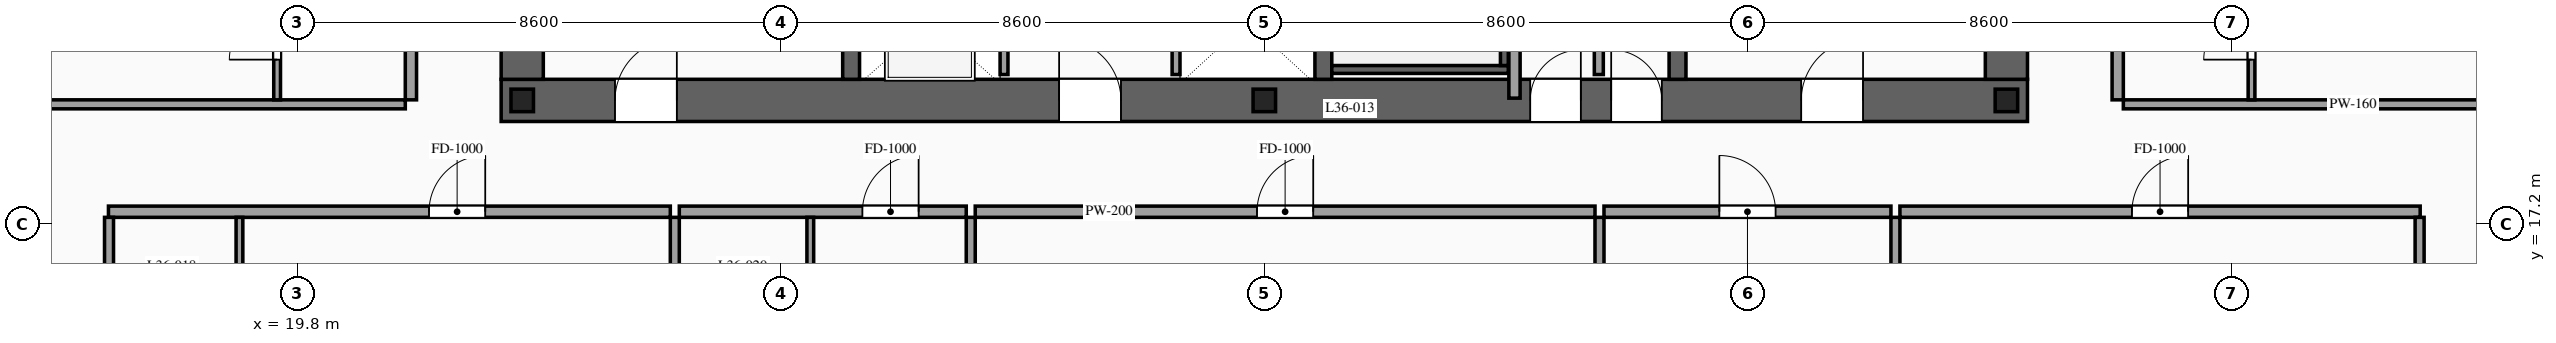
"""IFC4 building model, lengths in metres.
Left out: names, types, materials, properties, quantities, classifications, styles, units other than length and angle.
Written with IfcOpenShell. Run it as: python <this file> out.ifc"""

import sys

from ifc_helpers import new_model, si_unit, direction, frame, frame_2d, origin, origin_2d, place, context, subcontext, project, spatial, rectangle, i_section, extrude, source, transform, mapped, element, fill, save


model = new_model("IFC4")
c1 = context("Model", 3, precision=1e-05, world=origin(), true_north=direction((0.0, 1.0)))
c2 = subcontext(c1, "Body", "Model", "MODEL_VIEW")
j1 = project(units=[si_unit("LENGTHUNIT", "METRE"), si_unit("PLANEANGLEUNIT", "RADIAN")], contexts=[c1])
p1 = place(None, origin())
s1 = spatial("IfcSite", under=j1, at=p1, CompositionType="ELEMENT")
p2 = place(p1, origin())
s2 = spatial("IfcBuilding", under=s1, at=p2, CompositionType="ELEMENT")
p3 = place(p2, frame((0.0, 0.0, 138.0)))
s3 = spatial("IfcBuildingStorey", under=s2, at=p3, CompositionType="ELEMENT", Elevation=138.0)
p4 = place(p3, frame((23.425, 19.4, 0.0), z_axis=(0.0, 0.0, 1.0), x_axis=(1.0, 0.0, 0.0)))
e1 = element("IfcWall", 1, at=p4, inside=s3, PredefinedType="SHEAR", context=c2, shape_type="SweptSolid", body=[
    extrude(rectangle(XDim=27.15, YDim=0.75, at=frame_2d((13.575, 0.0))), origin(), (0.0, 0.0, 1.0), 3.6),
])
p5 = place(p4, frame((2.025, 0.0, 0.0)))
e2 = element("IfcOpeningElement", 2, at=p5, cuts=e1, PredefinedType="OPENING", context=c2, shape_type="SweptSolid", body=[
    extrude(rectangle(XDim=1.1, YDim=2.2, at=frame_2d((0.55, 1.1))), frame((0.0, 0.39, 0.0), z_axis=(0.0, -1.0, 0.0), x_axis=(1.0, 0.0, 0.0)), (0.0, 0.0, 1.0), 0.78),
])
p6 = place(p4, frame((9.925, 0.0, 0.0)))
e3 = element("IfcOpeningElement", 3, at=p6, cuts=e1, PredefinedType="OPENING", context=c2, shape_type="SweptSolid", body=[
    extrude(rectangle(XDim=1.1, YDim=2.2, at=frame_2d((0.55, 1.1))), frame((0.0, 0.39, 0.0), z_axis=(0.0, -1.0, 0.0), x_axis=(1.0, 0.0, 0.0)), (0.0, 0.0, 1.0), 0.78),
])
p7 = place(p4, frame((23.125, 0.0, 0.0)))
e4 = element("IfcOpeningElement", 4, at=p7, cuts=e1, PredefinedType="OPENING", context=c2, shape_type="SweptSolid", body=[
    extrude(rectangle(XDim=1.1, YDim=2.2, at=frame_2d((0.55, 1.1))), frame((0.0, 0.39, 0.0), z_axis=(0.0, -1.0, 0.0), x_axis=(1.0, 0.0, 0.0)), (0.0, 0.0, 1.0), 0.78),
])
p8 = place(p4, frame((19.745, 0.0, 0.0)))
e5 = element("IfcOpeningElement", 5, at=p8, cuts=e1, PredefinedType="OPENING", context=c2, shape_type="SweptSolid", body=[
    extrude(rectangle(XDim=0.9, YDim=2.15, at=frame_2d((0.45, 1.075))), frame((0.0, 0.39, 0.0), z_axis=(0.0, -1.0, 0.0), x_axis=(1.0, 0.0, 0.0)), (0.0, 0.0, 1.0), 0.78),
])
p9 = place(p4, frame((18.305, 0.0, 0.0)))
e6 = element("IfcOpeningElement", 6, at=p9, cuts=e1, PredefinedType="OPENING", context=c2, shape_type="SweptSolid", body=[
    extrude(rectangle(XDim=0.9, YDim=2.15, at=frame_2d((0.45, 1.075))), frame((0.0, 0.39, 0.0), z_axis=(0.0, -1.0, 0.0), x_axis=(1.0, 0.0, 0.0)), (0.0, 0.0, 1.0), 0.78),
])
m1 = source(origin(), c2, "Body", "SweptSolid", [
    extrude(rectangle(XDim=12.05, YDim=0.75, at=frame_2d((6.025, 0.0))), origin(), (0.0, 0.0, 1.0), 3.6),
])
for number, where, z_axis, x_axis in (
    (7, (23.8, 19.775, 0.0), (0.0, 0.0, 1.0), (0.0, 1.0, 0.0)),
    (8, (50.2, 19.775, 0.0), (0.0, 0.0, 1.0), (0.0, 1.0, 0.0)),
):
    element("IfcWall", number, at=place(p3, frame(where, z_axis=z_axis, x_axis=x_axis)), inside=s3, PredefinedType="SHEAR", context=c2, shape_type="MappedRepresentation", body=[
        mapped(m1, transform((0.0, 0.0, 0.0), scale=1.0)),
    ])
m2 = source(origin(), c2, "Body", "SweptSolid", [
    extrude(rectangle(XDim=12.05, YDim=0.3, at=frame_2d((6.025, 0.0))), origin(), (0.0, 0.0, 1.0), 3.6),
])
for number, where, z_axis, x_axis in (
    (9, (29.65, 19.775, 0.0), (0.0, 0.0, 1.0), (0.0, 1.0, 0.0)),
    (10, (38.05, 19.775, 0.0), (0.0, 0.0, 1.0), (0.0, 1.0, 0.0)),
    (11, (44.35, 19.775, 0.0), (0.0, 0.0, 1.0), (0.0, 1.0, 0.0)),
):
    element("IfcWall", number, at=place(p3, frame(where, z_axis=z_axis, x_axis=x_axis)), inside=s3, PredefinedType="SOLIDWALL", context=c2, shape_type="MappedRepresentation", body=[
        mapped(m2, transform((0.0, 0.0, 0.0), scale=1.0)),
    ])
m3 = source(origin(), c2, "Body", "SweptSolid", [
    extrude(i_section(OverallWidth=0.4, OverallDepth=0.4, WebThickness=0.013, FlangeThickness=0.021, at=origin_2d()), origin(), (0.0, 0.0, 1.0), 3.6),
])
for number, where, z_axis, x_axis in (
    (12, (23.8, 19.4, 0.0), (0.0, 0.0, 1.0), (1.0, 0.0, 0.0)),
    (13, (37.0, 19.4, 0.0), (0.0, 0.0, 1.0), (1.0, 0.0, 0.0)),
    (14, (50.2, 19.4, 0.0), (0.0, 0.0, 1.0), (1.0, 0.0, 0.0)),
):
    element("IfcColumn", number, at=place(p3, frame(where, z_axis=z_axis, x_axis=x_axis)), inside=s3, PredefinedType="COLUMN", context=c2, shape_type="MappedRepresentation", body=[
        mapped(m3, transform((0.0, 0.0, 0.0), scale=1.0)),
    ])
p10 = place(p3, frame((32.37, 19.86, 0.0), z_axis=(0.0, 0.0, 1.0), x_axis=(0.0, 1.0, 0.0)))
e15 = element("IfcWall", 15, at=p10, inside=s3, PredefinedType="SOLIDWALL", context=c2, shape_type="SweptSolid", body=[
    extrude(rectangle(XDim=2.04, YDim=0.14, at=frame_2d((1.02, 0.0))), origin(), (0.0, 0.0, 1.0), 3.38),
])
p11 = place(p10, frame((0.47, 0.0, 0.0)))
e16 = element("IfcOpeningElement", 16, at=p11, cuts=e15, PredefinedType="OPENING", context=c2, shape_type="SweptSolid", body=[
    extrude(rectangle(XDim=1.1, YDim=2.2, at=frame_2d((0.55, 1.1))), frame((0.0, 0.085, 0.0), z_axis=(0.0, -1.0, 0.0), x_axis=(1.0, 0.0, 0.0)), (0.0, 0.0, 1.0), 0.17),
])
m4 = source(origin(), c2, "Body", "SweptSolid", [
    extrude(rectangle(XDim=2.04, YDim=0.14, at=frame_2d((1.02, 0.0))), origin(), (0.0, 0.0, 1.0), 3.38),
])
p12 = place(p3, frame((35.43, 19.86, 0.0), z_axis=(0.0, 0.0, 1.0), x_axis=(0.0, 1.0, 0.0)))
e17 = element("IfcWall", 17, at=p12, inside=s3, PredefinedType="SOLIDWALL", context=c2, shape_type="MappedRepresentation", body=[
    mapped(m4, transform((0.0, 0.0, 0.0), scale=1.0)),
])
m5 = source(origin(), c2, "Body", "SweptSolid", [
    extrude(rectangle(XDim=3.14, YDim=0.14, at=frame_2d((1.57, 0.0))), origin(), (0.0, 0.0, 1.0), 3.38),
])
p13 = place(p3, frame((38.2, 19.95, 0.0), z_axis=(0.0, 0.0, 1.0), x_axis=(1.0, 0.0, 0.0)))
e18 = element("IfcWall", 18, at=p13, inside=s3, PredefinedType="SOLIDWALL", context=c2, shape_type="MappedRepresentation", body=[
    mapped(m5, transform((0.0, 0.0, 0.0), scale=1.0)),
])
m6 = source(origin(), c2, "Body", "SweptSolid", [
    extrude(rectangle(XDim=8.94, YDim=0.14, at=frame_2d((4.47, 0.0))), origin(), (0.0, 0.0, 1.0), 3.38),
])
p14 = place(p3, frame((41.27, 20.02, 0.0), z_axis=(0.0, 0.0, 1.0), x_axis=(0.0, 1.0, 0.0)))
e19 = element("IfcWall", 19, at=p14, inside=s3, PredefinedType="SOLIDWALL", context=c2, shape_type="MappedRepresentation", body=[
    mapped(m6, transform((0.0, 0.0, 0.0), scale=1.0)),
])
m7 = source(origin(), c2, "Body", "SweptSolid", [
    extrude(rectangle(XDim=1.34, YDim=0.16, at=frame_2d((0.67, 0.0))), origin(), (0.0, 0.0, 1.0), 3.38),
])
p15 = place(p3, frame((42.95, 19.86, 0.0), z_axis=(0.0, 0.0, 1.0), x_axis=(0.0, 1.0, 0.0)))
e20 = element("IfcWall", 20, at=p15, inside=s3, PredefinedType="PARTITIONING", context=c2, shape_type="MappedRepresentation", body=[
    mapped(m7, transform((0.0, 0.0, 0.0), scale=1.0)),
])
m8 = source(origin(), c2, "Body", "SweptSolid", [
    extrude(rectangle(XDim=6.51, YDim=0.2, at=frame_2d((3.255, 0.0))), origin(), (0.0, 0.0, 1.0), 3.38),
])
p16 = place(p3, frame((41.45, 19.44, 0.0), z_axis=(0.0, 0.0, 1.0), x_axis=(0.0, 1.0, 0.0)))
e21 = element("IfcWall", 21, at=p16, inside=s3, PredefinedType="PARTITIONING", context=c2, shape_type="MappedRepresentation", body=[
    mapped(m8, transform((0.0, 0.0, 0.0), scale=1.0)),
])
p17 = place(p3, frame((16.44, 17.42, 0.0), z_axis=(0.0, 0.0, 1.0), x_axis=(1.0, 0.0, 0.0)))
e22 = element("IfcWall", 22, at=p17, inside=s3, PredefinedType="PARTITIONING", context=c2, shape_type="SweptSolid", body=[
    extrude(rectangle(XDim=9.994, YDim=0.2, at=frame_2d((4.997, 0.0))), origin(), (0.0, 0.0, 1.0), 3.38),
])
p18 = place(p17, frame((5.702, 0.0, 0.0)))
e23 = element("IfcOpeningElement", 23, at=p18, cuts=e22, PredefinedType="OPENING", context=c2, shape_type="SweptSolid", body=[
    extrude(rectangle(XDim=1.0, YDim=2.2, at=frame_2d((0.5, 1.1))), frame((0.0, 0.115, 0.0), z_axis=(0.0, -1.0, 0.0), x_axis=(1.0, 0.0, 0.0)), (0.0, 0.0, 1.0), 0.23),
])
m9 = source(origin(), c2, "Body", "SweptSolid", [
    extrude(rectangle(XDim=14.97, YDim=0.16, at=frame_2d((7.485, 0.0))), origin(), (0.0, 0.0, 1.0), 3.38),
])
p19 = place(p3, frame((26.514, 2.35, 0.0), z_axis=(0.0, 0.0, 1.0), x_axis=(0.0, 1.0, 0.0)))
e24 = element("IfcWall", 24, at=p19, inside=s3, PredefinedType="PARTITIONING", context=c2, shape_type="MappedRepresentation", body=[
    mapped(m9, transform((0.0, 0.0, 0.0), scale=1.0)),
])
m10 = source(origin(), c2, "Body", "SweptSolid", [
    extrude(rectangle(XDim=2.42, YDim=0.12, at=frame_2d((1.21, 0.0))), origin(), (0.0, 0.0, 1.0), 3.38),
])
p20 = place(p3, frame((18.77, 14.9, 0.0), z_axis=(0.0, 0.0, 1.0), x_axis=(0.0, 1.0, 0.0)))
e25 = element("IfcWall", 25, at=p20, inside=s3, PredefinedType="PARTITIONING", context=c2, shape_type="MappedRepresentation", body=[
    mapped(m10, transform((0.0, 0.0, 0.0), scale=1.0)),
])
p21 = place(p3, frame((26.594, 17.42, 0.0), z_axis=(0.0, 0.0, 1.0), x_axis=(1.0, 0.0, 0.0)))
e26 = element("IfcWall", 26, at=p21, inside=s3, PredefinedType="PARTITIONING", context=c2, shape_type="SweptSolid", body=[
    extrude(rectangle(XDim=5.104, YDim=0.2, at=frame_2d((2.552, 0.0))), origin(), (0.0, 0.0, 1.0), 3.38),
])
p22 = place(p21, frame((3.257, 0.0, 0.0)))
e27 = element("IfcOpeningElement", 27, at=p22, cuts=e26, PredefinedType="OPENING", context=c2, shape_type="SweptSolid", body=[
    extrude(rectangle(XDim=1.0, YDim=2.2, at=frame_2d((0.5, 1.1))), frame((0.0, 0.115, 0.0), z_axis=(0.0, -1.0, 0.0), x_axis=(1.0, 0.0, 0.0)), (0.0, 0.0, 1.0), 0.23),
])
p23 = place(p3, frame((31.778, 2.35, 0.0), z_axis=(0.0, 0.0, 1.0), x_axis=(0.0, 1.0, 0.0)))
e28 = element("IfcWall", 28, at=p23, inside=s3, PredefinedType="PARTITIONING", context=c2, shape_type="MappedRepresentation", body=[
    mapped(m9, transform((0.0, 0.0, 0.0), scale=1.0)),
])
p24 = place(p3, frame((28.924, 14.9, 0.0), z_axis=(0.0, 0.0, 1.0), x_axis=(0.0, 1.0, 0.0)))
e29 = element("IfcWall", 29, at=p24, inside=s3, PredefinedType="PARTITIONING", context=c2, shape_type="MappedRepresentation", body=[
    mapped(m10, transform((0.0, 0.0, 0.0), scale=1.0)),
])
p25 = place(p3, frame((31.858, 17.42, 0.0), z_axis=(0.0, 0.0, 1.0), x_axis=(1.0, 0.0, 0.0)))
e30 = element("IfcWall", 30, at=p25, inside=s3, PredefinedType="PARTITIONING", context=c2, shape_type="SweptSolid", body=[
    extrude(rectangle(XDim=11.024, YDim=0.2, at=frame_2d((5.512, 0.0))), origin(), (0.0, 0.0, 1.0), 3.38),
])
p26 = place(p25, frame((5.012, 0.0, 0.0)))
e31 = element("IfcOpeningElement", 31, at=p26, cuts=e30, PredefinedType="OPENING", context=c2, shape_type="SweptSolid", body=[
    extrude(rectangle(XDim=1.0, YDim=2.2, at=frame_2d((0.5, 1.1))), frame((0.0, 0.115, 0.0), z_axis=(0.0, -1.0, 0.0), x_axis=(1.0, 0.0, 0.0)), (0.0, 0.0, 1.0), 0.23),
])
p27 = place(p3, frame((42.962, 2.35, 0.0), z_axis=(0.0, 0.0, 1.0), x_axis=(0.0, 1.0, 0.0)))
e32 = element("IfcWall", 32, at=p27, inside=s3, PredefinedType="PARTITIONING", context=c2, shape_type="MappedRepresentation", body=[
    mapped(m9, transform((0.0, 0.0, 0.0), scale=1.0)),
])
p28 = place(p3, frame((43.042, 17.42, 0.0), z_axis=(0.0, 0.0, 1.0), x_axis=(1.0, 0.0, 0.0)))
e33 = element("IfcWall", 33, at=p28, inside=s3, PredefinedType="PARTITIONING", context=c2, shape_type="SweptSolid", body=[
    extrude(rectangle(XDim=5.104, YDim=0.2, at=frame_2d((2.552, 0.0))), origin(), (0.0, 0.0, 1.0), 3.38),
])
p29 = place(p28, frame((2.052, 0.0, 0.0)))
e34 = element("IfcOpeningElement", 34, at=p29, cuts=e33, PredefinedType="OPENING", context=c2, shape_type="SweptSolid", body=[
    extrude(rectangle(XDim=1.0, YDim=2.2, at=frame_2d((0.5, 1.1))), frame((0.0, 0.115, 0.0), z_axis=(0.0, -1.0, 0.0), x_axis=(1.0, 0.0, 0.0)), (0.0, 0.0, 1.0), 0.23),
])
p30 = place(p3, frame((48.226, 2.35, 0.0), z_axis=(0.0, 0.0, 1.0), x_axis=(0.0, 1.0, 0.0)))
e35 = element("IfcWall", 35, at=p30, inside=s3, PredefinedType="PARTITIONING", context=c2, shape_type="MappedRepresentation", body=[
    mapped(m9, transform((0.0, 0.0, 0.0), scale=1.0)),
])
p31 = place(p3, frame((48.306, 17.42, 0.0), z_axis=(0.0, 0.0, 1.0), x_axis=(1.0, 0.0, 0.0)))
e36 = element("IfcWall", 36, at=p31, inside=s3, PredefinedType="PARTITIONING", context=c2, shape_type="SweptSolid", body=[
    extrude(rectangle(XDim=9.254, YDim=0.2, at=frame_2d((4.627, 0.0))), origin(), (0.0, 0.0, 1.0), 3.38),
])
p32 = place(p31, frame((4.127, 0.0, 0.0)))
e37 = element("IfcOpeningElement", 37, at=p32, cuts=e36, PredefinedType="OPENING", context=c2, shape_type="SweptSolid", body=[
    extrude(rectangle(XDim=1.0, YDim=2.2, at=frame_2d((0.5, 1.1))), frame((0.0, 0.115, 0.0), z_axis=(0.0, -1.0, 0.0), x_axis=(1.0, 0.0, 0.0)), (0.0, 0.0, 1.0), 0.23),
])
m11 = source(origin(), c2, "Body", "SweptSolid", [
    extrude(rectangle(XDim=14.82, YDim=0.16, at=frame_2d((7.41, 0.0))), origin(), (0.0, 0.0, 1.0), 3.38),
])
for number, where, z_axis, x_axis in (
    (38, (16.45, 2.5, 0.0), (0.0, 0.0, 1.0), (0.0, 1.0, 0.0)),
    (39, (57.55, 2.5, 0.0), (0.0, 0.0, 1.0), (0.0, 1.0, 0.0)),
):
    element("IfcWall", number, at=place(p3, frame(where, z_axis=z_axis, x_axis=x_axis)), inside=s3, PredefinedType="PARTITIONING", context=c2, shape_type="MappedRepresentation", body=[
        mapped(m11, transform((0.0, 0.0, 0.0), scale=1.0)),
    ])
p33 = place(p3, frame((21.82, 19.41, 0.0), z_axis=(0.0, 0.0, 1.0), x_axis=(0.0, 1.0, 0.0)))
e40 = element("IfcWall", 40, at=p33, inside=s3, PredefinedType="PARTITIONING", context=c2, shape_type="SweptSolid", body=[
    extrude(rectangle(XDim=6.31, YDim=0.2, at=frame_2d((3.155, 0.0))), origin(), (0.0, 0.0, 1.0), 3.38),
])
p34 = place(p33, frame((3.835, 0.0, 0.0)))
e41 = element("IfcOpeningElement", 41, at=p34, cuts=e40, PredefinedType="OPENING", context=c2, shape_type="SweptSolid", body=[
    extrude(rectangle(XDim=1.0, YDim=2.2, at=frame_2d((0.5, 1.1))), frame((0.0, 0.115, 0.0), z_axis=(0.0, -1.0, 0.0), x_axis=(1.0, 0.0, 0.0)), (0.0, 0.0, 1.0), 0.23),
])
m12 = source(origin(), c2, "Body", "SweptSolid", [
    extrude(rectangle(XDim=8.17, YDim=0.16, at=frame_2d((4.085, 0.0))), origin(), (0.0, 0.0, 1.0), 2.875),
])
p35 = place(p3, frame((13.55, 19.33, 0.0), z_axis=(0.0, 0.0, 1.0), x_axis=(1.0, 0.0, 0.0)))
e42 = element("IfcWall", 42, at=p35, inside=s3, PredefinedType="PARTITIONING", context=c2, shape_type="MappedRepresentation", body=[
    mapped(m12, transform((0.0, 0.0, 0.0), scale=1.0)),
])
p36 = place(p3, frame((19.44, 19.41, 0.0), z_axis=(0.0, 0.0, 1.0), x_axis=(0.0, 1.0, 0.0)))
e43 = element("IfcWall", 43, at=p36, inside=s3, PredefinedType="PARTITIONING", context=c2, shape_type="SweptSolid", body=[
    extrude(rectangle(XDim=2.28, YDim=0.12, at=frame_2d((1.14, 0.0))), origin(), (0.0, 0.0, 1.0), 3.38),
])
p37 = place(p36, frame((0.715, 0.0, 0.0)))
e44 = element("IfcOpeningElement", 44, at=p37, cuts=e43, PredefinedType="OPENING", context=c2, shape_type="SweptSolid", body=[
    extrude(rectangle(XDim=0.85, YDim=2.1, at=frame_2d((0.425, 1.05))), frame((0.0, 0.075, 0.0), z_axis=(0.0, -1.0, 0.0), x_axis=(1.0, 0.0, 0.0)), (0.0, 0.0, 1.0), 0.15),
])
p38 = place(p3, frame((52.18, 19.41, 0.0), z_axis=(0.0, 0.0, 1.0), x_axis=(0.0, 1.0, 0.0)))
e45 = element("IfcWall", 45, at=p38, inside=s3, PredefinedType="PARTITIONING", context=c2, shape_type="SweptSolid", body=[
    extrude(rectangle(XDim=6.31, YDim=0.2, at=frame_2d((3.155, 0.0))), origin(), (0.0, 0.0, 1.0), 3.38),
])
p39 = place(p38, frame((3.835, 0.0, 0.0)))
e46 = element("IfcOpeningElement", 46, at=p39, cuts=e45, PredefinedType="OPENING", context=c2, shape_type="SweptSolid", body=[
    extrude(rectangle(XDim=1.0, YDim=2.2, at=frame_2d((0.5, 1.1))), frame((0.0, 0.115, 0.0), z_axis=(0.0, -1.0, 0.0), x_axis=(1.0, 0.0, 0.0)), (0.0, 0.0, 1.0), 0.23),
])
p40 = place(p3, frame((52.28, 19.33, 0.0), z_axis=(0.0, 0.0, 1.0), x_axis=(1.0, 0.0, 0.0)))
e47 = element("IfcWall", 47, at=p40, inside=s3, PredefinedType="PARTITIONING", context=c2, shape_type="MappedRepresentation", body=[
    mapped(m12, transform((0.0, 0.0, 0.0), scale=1.0)),
])
p41 = place(p3, frame((54.56, 19.41, 0.0), z_axis=(0.0, 0.0, 1.0), x_axis=(0.0, 1.0, 0.0)))
e48 = element("IfcWall", 48, at=p41, inside=s3, PredefinedType="PARTITIONING", context=c2, shape_type="SweptSolid", body=[
    extrude(rectangle(XDim=2.28, YDim=0.12, at=frame_2d((1.14, 0.0))), origin(), (0.0, 0.0, 1.0), 3.38),
])
p42 = place(p41, frame((0.715, 0.0, 0.0)))
e49 = element("IfcOpeningElement", 49, at=p42, cuts=e48, PredefinedType="OPENING", context=c2, shape_type="SweptSolid", body=[
    extrude(rectangle(XDim=0.85, YDim=2.1, at=frame_2d((0.425, 1.05))), frame((0.0, 0.075, 0.0), z_axis=(0.0, -1.0, 0.0), x_axis=(1.0, 0.0, 0.0)), (0.0, 0.0, 1.0), 0.15),
])
m13 = source(origin(), c2, "Body", "SweptSolid", [
    extrude(rectangle(XDim=1.1, YDim=2.2, at=frame_2d((0.55, 1.1))), frame((0.0, 0.025, 0.0), z_axis=(0.0, -1.0, 0.0), x_axis=(1.0, 0.0, 0.0)), (0.0, 0.0, 1.0), 0.05),
])
p43 = place(p5, origin())
e50 = element("IfcDoor", 50, at=p43, inside=s3, OperationType="SINGLE_SWING_RIGHT", PredefinedType="DOOR", context=c2, shape_type="MappedRepresentation", body=[
    mapped(m13, transform((0.0, 0.0, 0.0), scale=1.0)),
])
fill(e2, e50)
p44 = place(p6, origin())
e51 = element("IfcDoor", 51, at=p44, inside=s3, OperationType="SINGLE_SWING_LEFT", PredefinedType="DOOR", context=c2, shape_type="MappedRepresentation", body=[
    mapped(m13, transform((0.0, 0.0, 0.0), scale=1.0)),
])
fill(e3, e51)
p45 = place(p7, origin())
e52 = element("IfcDoor", 52, at=p45, inside=s3, OperationType="SINGLE_SWING_RIGHT", PredefinedType="DOOR", context=c2, shape_type="MappedRepresentation", body=[
    mapped(m13, transform((0.0, 0.0, 0.0), scale=1.0)),
])
fill(e4, e52)
m14 = source(origin(), c2, "Body", "SweptSolid", [
    extrude(rectangle(XDim=0.9, YDim=2.15, at=frame_2d((0.45, 1.075))), frame((0.0, 0.025, 0.0), z_axis=(0.0, -1.0, 0.0), x_axis=(1.0, 0.0, 0.0)), (0.0, 0.0, 1.0), 0.05),
])
p46 = place(p8, origin())
e53 = element("IfcDoor", 53, at=p46, inside=s3, OperationType="SINGLE_SWING_LEFT", PredefinedType="DOOR", context=c2, shape_type="MappedRepresentation", body=[
    mapped(m14, transform((0.0, 0.0, 0.0), scale=1.0)),
])
fill(e5, e53)
p47 = place(p9, origin())
e54 = element("IfcDoor", 54, at=p47, inside=s3, OperationType="SINGLE_SWING_RIGHT", PredefinedType="DOOR", context=c2, shape_type="MappedRepresentation", body=[
    mapped(m14, transform((0.0, 0.0, 0.0), scale=1.0)),
])
fill(e6, e54)
m15 = source(origin(), c2, "Body", "SweptSolid", [
    extrude(rectangle(XDim=1.0, YDim=2.2, at=frame_2d((0.5, 1.1))), frame((0.0, 0.025, 0.0), z_axis=(0.0, -1.0, 0.0), x_axis=(1.0, 0.0, 0.0)), (0.0, 0.0, 1.0), 0.05),
])
p48 = place(p18, origin())
e55 = element("IfcDoor", 55, at=p48, inside=s3, OperationType="SINGLE_SWING_RIGHT", PredefinedType="DOOR", context=c2, shape_type="MappedRepresentation", body=[
    mapped(m15, transform((0.0, 0.0, 0.0), scale=1.0)),
])
fill(e23, e55)
p49 = place(p22, origin())
e56 = element("IfcDoor", 56, at=p49, inside=s3, OperationType="SINGLE_SWING_RIGHT", PredefinedType="DOOR", context=c2, shape_type="MappedRepresentation", body=[
    mapped(m15, transform((0.0, 0.0, 0.0), scale=1.0)),
])
fill(e27, e56)
p50 = place(p26, origin())
e57 = element("IfcDoor", 57, at=p50, inside=s3, OperationType="SINGLE_SWING_RIGHT", PredefinedType="DOOR", context=c2, shape_type="MappedRepresentation", body=[
    mapped(m15, transform((0.0, 0.0, 0.0), scale=1.0)),
])
fill(e31, e57)
p51 = place(p29, origin())
e58 = element("IfcDoor", 58, at=p51, inside=s3, OperationType="SINGLE_SWING_LEFT", PredefinedType="DOOR", context=c2, shape_type="MappedRepresentation", body=[
    mapped(m15, transform((0.0, 0.0, 0.0), scale=1.0)),
])
fill(e34, e58)
p52 = place(p32, origin())
e59 = element("IfcDoor", 59, at=p52, inside=s3, OperationType="SINGLE_SWING_RIGHT", PredefinedType="DOOR", context=c2, shape_type="MappedRepresentation", body=[
    mapped(m15, transform((0.0, 0.0, 0.0), scale=1.0)),
])
fill(e37, e59)
m16 = source(origin(), c2, "Body", "SweptSolid", [
    extrude(rectangle(XDim=0.85, YDim=2.1, at=frame_2d((0.425, 1.05))), frame((0.0, 0.025, 0.0), z_axis=(0.0, -1.0, 0.0), x_axis=(1.0, 0.0, 0.0)), (0.0, 0.0, 1.0), 0.05),
])
p53 = place(p37, origin())
e60 = element("IfcDoor", 60, at=p53, inside=s3, OperationType="SINGLE_SWING_LEFT", PredefinedType="DOOR", context=c2, shape_type="MappedRepresentation", body=[
    mapped(m16, transform((0.0, 0.0, 0.0), scale=1.0)),
])
fill(e44, e60)
p54 = place(p42, origin())
e61 = element("IfcDoor", 61, at=p54, inside=s3, OperationType="SINGLE_SWING_LEFT", PredefinedType="DOOR", context=c2, shape_type="MappedRepresentation", body=[
    mapped(m16, transform((0.0, 0.0, 0.0), scale=1.0)),
])
fill(e49, e61)
save(model, sys.argv[1])
